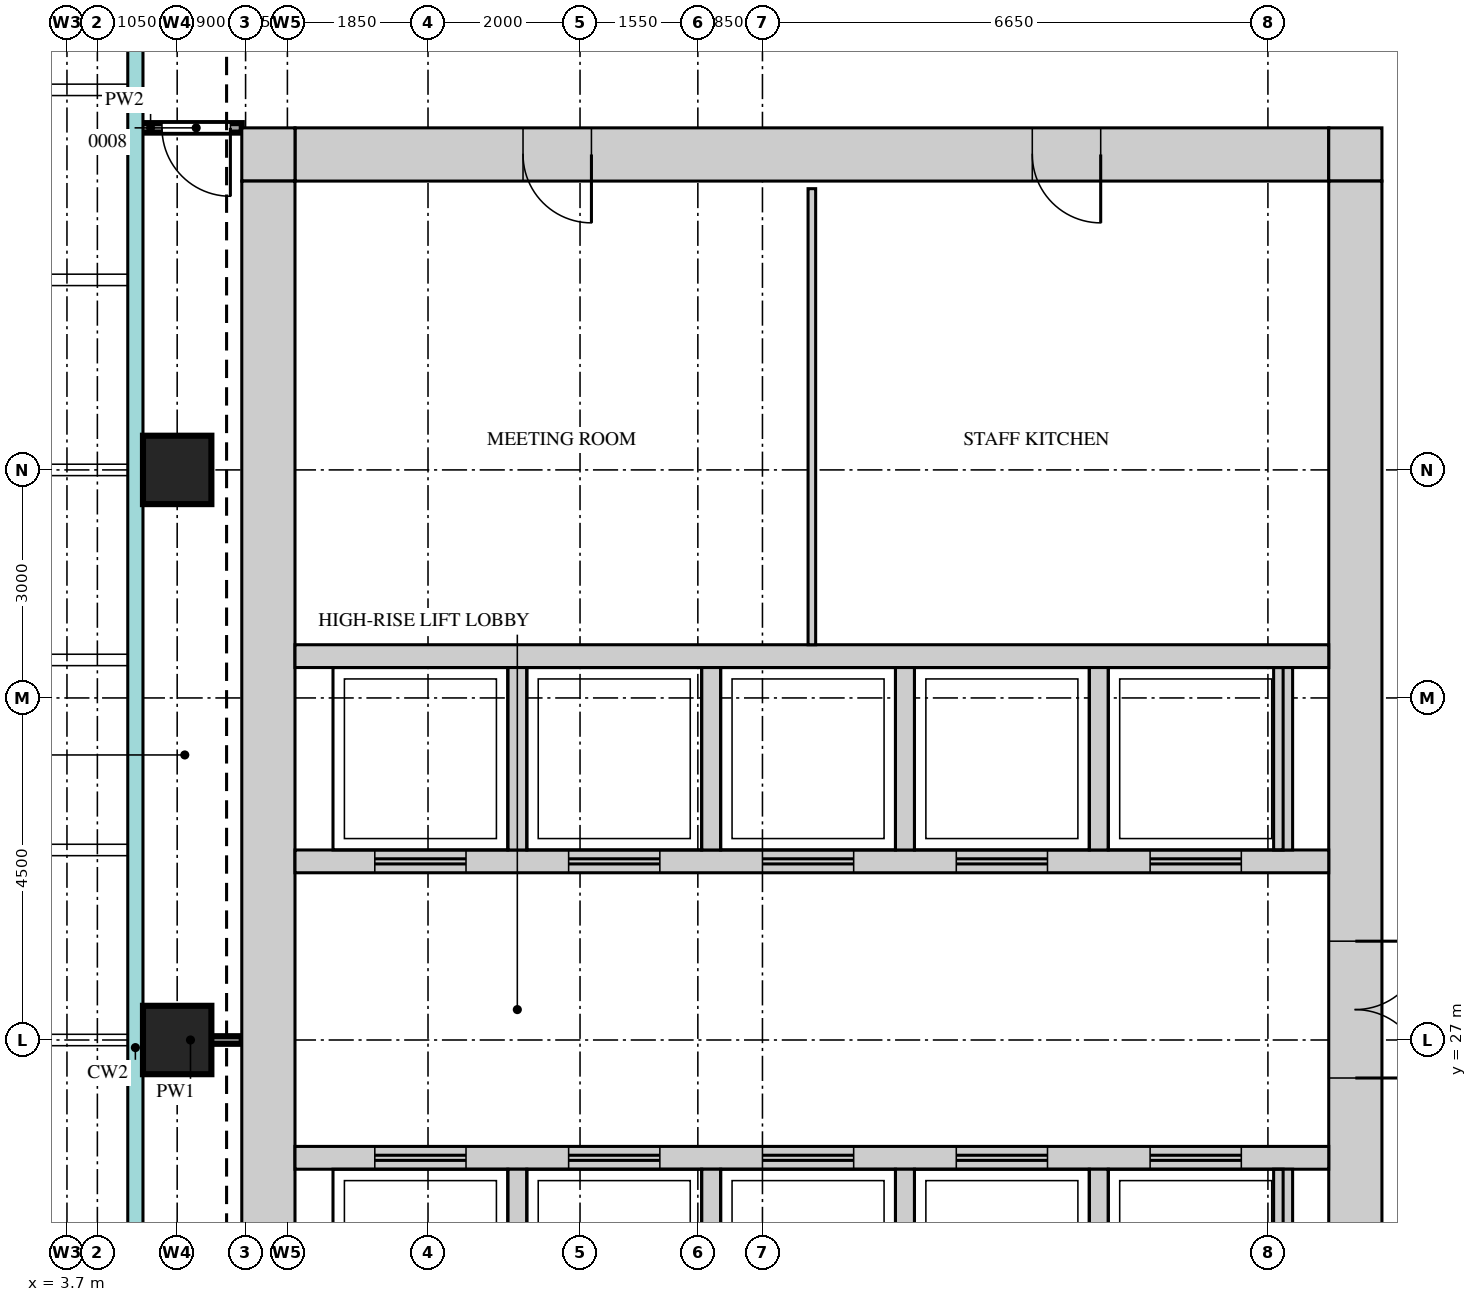
"""IFC4 building model, lengths in metres.
Left out: names, types, materials, properties, quantities, classifications, styles, units other than length and angle.
Written with IfcOpenShell. Run it as: python <this file> out.ifc"""

import sys

from ifc_helpers import new_model, si_unit, direction, frame, frame_2d, origin, origin_2d, place, context, subcontext, project, spatial, rectangle, extrude, source, transform, mapped, element, fill, save


model = new_model("IFC4")
c1 = context("Model", 3, precision=1e-05, world=origin(), true_north=direction((0.0, 1.0)))
c2 = subcontext(c1, "Body", "Model", "MODEL_VIEW")
j1 = project(units=[si_unit("LENGTHUNIT", "METRE"), si_unit("PLANEANGLEUNIT", "RADIAN")], contexts=[c1])
p1 = place(None, origin())
s1 = spatial("IfcSite", under=j1, at=p1, CompositionType="ELEMENT")
p2 = place(p1, origin())
s2 = spatial("IfcBuilding", under=s1, at=p2, CompositionType="ELEMENT")
p3 = place(p2, frame((0.0, 0.0, 222.2)))
s3 = spatial("IfcBuildingStorey", under=s2, at=p3, CompositionType="ELEMENT", Elevation=222.2)
m1 = source(origin(), c2, "Body", "SweptSolid", [
    extrude(rectangle(XDim=13.6, YDim=0.7, at=frame_2d((6.8, 0.0))), origin(), (0.0, 0.0, 1.0), 3.75),
])
p4 = place(p3, frame((6.7, 38.65, 0.0), z_axis=(0.0, 0.0, 1.0), x_axis=(1.0, 0.0, 0.0)))
e1 = element("IfcWall", 1, at=p4, inside=s3, PredefinedType="SHEAR", context=c2, shape_type="MappedRepresentation", body=[
    mapped(m1, transform((0.0, 0.0, 0.0))),
])
m2 = source(origin(), c2, "Body", "SweptSolid", [
    extrude(rectangle(XDim=0.9, YDim=2.1, at=frame_2d((0.45, 1.05))), frame((0.0, 0.36, 0.0), z_axis=(0.0, -1.0, 0.0), x_axis=(1.0, 0.0, 0.0)), (0.0, 0.0, 1.0), 0.72),
])
p5 = place(p4, frame((3.0, 0.0, 0.0)))
e2 = element("IfcOpeningElement", 2, at=p5, cuts=e1, PredefinedType="OPENING", context=c2, shape_type="MappedRepresentation", body=[
    mapped(m2, transform((0.0, 0.0, 0.0))),
])
p6 = place(p4, frame((9.7, 0.0, 0.0)))
e3 = element("IfcOpeningElement", 3, at=p6, cuts=e1, PredefinedType="OPENING", context=c2, shape_type="MappedRepresentation", body=[
    mapped(m2, transform((0.0, 0.0, 0.0))),
])
m3 = source(origin(), c2, "Body", "SweptSolid", [
    extrude(rectangle(XDim=0.7, YDim=0.7, at=frame_2d((0.35, 0.0))), origin(), (0.0, 0.0, 1.0), 3.75),
])
for number, where, z_axis, x_axis in (
    (4, (20.3, 38.65, 0.0), (0.0, 0.0, 1.0), (1.0, 0.0, 0.0)),
    (5, (6.0, 38.65, 0.0), (0.0, 0.0, 1.0), (1.0, 0.0, 0.0)),
):
    element("IfcWall", number, at=place(p3, frame(where, z_axis=z_axis, x_axis=x_axis)), inside=s3, PredefinedType="SHEAR", context=c2, shape_type="MappedRepresentation", body=[
        mapped(m3, transform((0.0, 0.0, 0.0))),
    ])
m4 = source(origin(), c2, "Body", "SweptSolid", [
    extrude(rectangle(XDim=22.6, YDim=0.7, at=frame_2d((11.3, 0.0))), origin(), (0.0, 0.0, 1.0), 3.75),
])
p7 = place(p3, frame((20.65, 15.7, 0.0), z_axis=(0.0, 0.0, 1.0), x_axis=(0.0, 1.0, 0.0)))
e6 = element("IfcWall", 6, at=p7, inside=s3, PredefinedType="SHEAR", context=c2, shape_type="MappedRepresentation", body=[
    mapped(m4, transform((0.0, 0.0, 0.0))),
])
m5 = source(origin(), c2, "Body", "SweptSolid", [
    extrude(rectangle(XDim=1.8, YDim=2.1, at=frame_2d((0.9, 1.05))), frame((0.0, 0.36, 0.0), z_axis=(0.0, -1.0, 0.0), x_axis=(1.0, 0.0, 0.0)), (0.0, 0.0, 1.0), 0.72),
])
p8 = place(p7, frame((10.8, 0.0, 0.0)))
e7 = element("IfcOpeningElement", 7, at=p8, cuts=e6, PredefinedType="OPENING", context=c2, shape_type="MappedRepresentation", body=[
    mapped(m5, transform((0.0, 0.0, 0.0))),
])
p9 = place(p7, frame((0.45, 0.0, 0.0)))
e8 = element("IfcOpeningElement", 8, at=p9, cuts=e6, PredefinedType="OPENING", context=c2, shape_type="MappedRepresentation", body=[
    mapped(m2, transform((0.0, 0.0, 0.0))),
])
p10 = place(p7, frame((2.9, 0.0, 0.0)))
e9 = element("IfcOpeningElement", 9, at=p10, cuts=e6, PredefinedType="OPENING", context=c2, shape_type="MappedRepresentation", body=[
    mapped(m2, transform((0.0, 0.0, 0.0))),
])
p11 = place(p7, frame((5.65, 0.0, 0.0)))
e10 = element("IfcOpeningElement", 10, at=p11, cuts=e6, PredefinedType="OPENING", context=c2, shape_type="MappedRepresentation", body=[
    mapped(m2, transform((0.0, 0.0, 0.0))),
])
p12 = place(p3, frame((6.35, 15.7, 0.0), z_axis=(0.0, 0.0, 1.0), x_axis=(0.0, 1.0, 0.0)))
e11 = element("IfcWall", 11, at=p12, inside=s3, PredefinedType="SHEAR", context=c2, shape_type="MappedRepresentation", body=[
    mapped(m4, transform((0.0, 0.0, 0.0))),
])
m6 = source(origin(), c2, "Body", "SweptSolid", [
    extrude(rectangle(XDim=13.6, YDim=0.3, at=frame_2d((6.8, 0.0))), origin(), (0.0, 0.0, 1.0), 3.75),
])
p13 = place(p3, frame((6.7, 32.05, 0.0), z_axis=(0.0, 0.0, 1.0), x_axis=(1.0, 0.0, 0.0)))
e12 = element("IfcWall", 12, at=p13, inside=s3, PredefinedType="STANDARD", context=c2, shape_type="MappedRepresentation", body=[
    mapped(m6, transform((0.0, 0.0, 0.0))),
])
p14 = place(p3, frame((6.7, 29.35, 0.0), z_axis=(0.0, 0.0, 1.0), x_axis=(1.0, 0.0, 0.0)))
e13 = element("IfcWall", 13, at=p14, inside=s3, PredefinedType="STANDARD", context=c2, shape_type="MappedRepresentation", body=[
    mapped(m6, transform((0.0, 0.0, 0.0))),
])
m7 = source(origin(), c2, "Body", "SweptSolid", [
    extrude(rectangle(XDim=1.2, YDim=2.1, at=frame_2d((0.6, 1.05))), frame((0.0, 0.16, 0.0), z_axis=(0.0, -1.0, 0.0), x_axis=(1.0, 0.0, 0.0)), (0.0, 0.0, 1.0), 0.32),
])
p15 = place(p14, frame((1.05, 0.0, 0.0)))
e14 = element("IfcOpeningElement", 14, at=p15, cuts=e13, PredefinedType="OPENING", context=c2, shape_type="MappedRepresentation", body=[
    mapped(m7, transform((0.0, 0.0, 0.0))),
])
p16 = place(p14, frame((3.6, 0.0, 0.0)))
e15 = element("IfcOpeningElement", 15, at=p16, cuts=e13, PredefinedType="OPENING", context=c2, shape_type="MappedRepresentation", body=[
    mapped(m7, transform((0.0, 0.0, 0.0))),
])
p17 = place(p14, frame((6.15, 0.0, 0.0)))
e16 = element("IfcOpeningElement", 16, at=p17, cuts=e13, PredefinedType="OPENING", context=c2, shape_type="MappedRepresentation", body=[
    mapped(m7, transform((0.0, 0.0, 0.0))),
])
p18 = place(p14, frame((8.7, 0.0, 0.0)))
e17 = element("IfcOpeningElement", 17, at=p18, cuts=e13, PredefinedType="OPENING", context=c2, shape_type="MappedRepresentation", body=[
    mapped(m7, transform((0.0, 0.0, 0.0))),
])
p19 = place(p14, frame((11.25, 0.0, 0.0)))
e18 = element("IfcOpeningElement", 18, at=p19, cuts=e13, PredefinedType="OPENING", context=c2, shape_type="MappedRepresentation", body=[
    mapped(m7, transform((0.0, 0.0, 0.0))),
])
p20 = place(p3, frame((6.7, 25.45, 0.0), z_axis=(0.0, 0.0, 1.0), x_axis=(1.0, 0.0, 0.0)))
e19 = element("IfcWall", 19, at=p20, inside=s3, PredefinedType="STANDARD", context=c2, shape_type="MappedRepresentation", body=[
    mapped(m6, transform((0.0, 0.0, 0.0))),
])
p21 = place(p20, frame((1.05, 0.0, 0.0)))
e20 = element("IfcOpeningElement", 20, at=p21, cuts=e19, PredefinedType="OPENING", context=c2, shape_type="MappedRepresentation", body=[
    mapped(m7, transform((0.0, 0.0, 0.0))),
])
p22 = place(p20, frame((3.6, 0.0, 0.0)))
e21 = element("IfcOpeningElement", 21, at=p22, cuts=e19, PredefinedType="OPENING", context=c2, shape_type="MappedRepresentation", body=[
    mapped(m7, transform((0.0, 0.0, 0.0))),
])
p23 = place(p20, frame((6.15, 0.0, 0.0)))
e22 = element("IfcOpeningElement", 22, at=p23, cuts=e19, PredefinedType="OPENING", context=c2, shape_type="MappedRepresentation", body=[
    mapped(m7, transform((0.0, 0.0, 0.0))),
])
p24 = place(p20, frame((8.7, 0.0, 0.0)))
e23 = element("IfcOpeningElement", 23, at=p24, cuts=e19, PredefinedType="OPENING", context=c2, shape_type="MappedRepresentation", body=[
    mapped(m7, transform((0.0, 0.0, 0.0))),
])
p25 = place(p20, frame((11.25, 0.0, 0.0)))
e24 = element("IfcOpeningElement", 24, at=p25, cuts=e19, PredefinedType="OPENING", context=c2, shape_type="MappedRepresentation", body=[
    mapped(m7, transform((0.0, 0.0, 0.0))),
])
m8 = source(origin(), c2, "Body", "SweptSolid", [
    extrude(rectangle(XDim=2.4, YDim=0.25, at=frame_2d((1.2, 0.0))), origin(), (0.0, 0.0, 1.0), 3.75),
])
for number, where, z_axis, x_axis in (
    (25, (17.275, 29.5, 0.0), (0.0, 0.0, 1.0), (0.0, 1.0, 0.0)),
    (26, (19.7, 29.5, 0.0), (0.0, 0.0, 1.0), (0.0, 1.0, 0.0)),
    (27, (9.625, 29.5, 0.0), (0.0, 0.0, 1.0), (0.0, 1.0, 0.0)),
    (28, (12.175, 29.5, 0.0), (0.0, 0.0, 1.0), (0.0, 1.0, 0.0)),
    (29, (14.725, 29.5, 0.0), (0.0, 0.0, 1.0), (0.0, 1.0, 0.0)),
):
    element("IfcWall", number, at=place(p3, frame(where, z_axis=z_axis, x_axis=x_axis)), inside=s3, PredefinedType="STANDARD", context=c2, shape_type="MappedRepresentation", body=[
        mapped(m8, transform((0.0, 0.0, 0.0))),
    ])
m9 = source(origin(), c2, "Body", "SweptSolid", [
    extrude(rectangle(XDim=2.4, YDim=0.25, at=frame_2d((1.2, 0.0))), origin(), (0.0, 0.0, 1.0), 3.75),
])
for number, where, z_axis, x_axis in (
    (30, (17.275, 22.9, 0.0), (0.0, 0.0, 1.0), (0.0, 1.0, 0.0)),
    (31, (19.7, 22.9, 0.0), (0.0, 0.0, 1.0), (0.0, 1.0, 0.0)),
    (32, (9.625, 22.9, 0.0), (0.0, 0.0, 1.0), (0.0, 1.0, 0.0)),
    (33, (12.175, 22.9, 0.0), (0.0, 0.0, 1.0), (0.0, 1.0, 0.0)),
    (34, (14.725, 22.9, 0.0), (0.0, 0.0, 1.0), (0.0, 1.0, 0.0)),
):
    element("IfcWall", number, at=place(p3, frame(where, z_axis=z_axis, x_axis=x_axis)), inside=s3, PredefinedType="STANDARD", context=c2, shape_type="MappedRepresentation", body=[
        mapped(m9, transform((0.0, 0.0, 0.0))),
    ])
m10 = source(origin(), c2, "Body", "SweptSolid", [
    extrude(rectangle(XDim=0.9, YDim=0.9, at=origin_2d()), origin(), (0.0, 0.0, 1.0), 3.75),
])
for number, where, z_axis, x_axis in (
    (35, (5.15, 27.0, 0.0), (0.0, 0.0, 1.0), (1.0, 0.0, 0.0)),
    (36, (5.15, 34.5, 0.0), (0.0, 0.0, 1.0), (1.0, 0.0, 0.0)),
):
    element("IfcColumn", number, at=place(p3, frame(where, z_axis=z_axis, x_axis=x_axis)), inside=s3, PredefinedType="COLUMN", context=c2, shape_type="MappedRepresentation", body=[
        mapped(m10, transform((0.0, 0.0, 0.0))),
    ])
m11 = source(origin(), c2, "Body", "SweptSolid", [
    extrude(rectangle(XDim=1.35, YDim=0.1, at=frame_2d((0.675, 0.0))), origin(), (0.0, 0.0, 1.0), 3.8),
])
p26 = place(p3, frame((4.65, 27.0, 0.0), z_axis=(0.0, 0.0, 1.0), x_axis=(1.0, 0.0, 0.0)))
e37 = element("IfcWall", 37, at=p26, inside=s3, PredefinedType="PARTITIONING", context=c2, shape_type="MappedRepresentation", body=[
    mapped(m11, transform((0.0, 0.0, 0.0))),
])
m12 = source(origin(), c2, "Body", "SweptSolid", [
    extrude(rectangle(XDim=6.0, YDim=0.1, at=frame_2d((3.0, 0.0))), origin(), (0.0, 0.0, 1.0), 3.8),
])
p27 = place(p3, frame((13.5, 32.2, 0.0), z_axis=(0.0, 0.0, 1.0), x_axis=(0.0, 1.0, 0.0)))
e38 = element("IfcWall", 38, at=p27, inside=s3, PredefinedType="PARTITIONING", context=c2, shape_type="MappedRepresentation", body=[
    mapped(m12, transform((0.0, 0.0, 0.0))),
])
m13 = source(origin(), c2, "Body", "SweptSolid", [
    extrude(rectangle(XDim=1.35, YDim=0.125, at=frame_2d((0.675, 0.0))), origin(), (0.0, 0.0, 1.0), 3.8),
])
p28 = place(p3, frame((4.65, 39.0, 0.0), z_axis=(0.0, 0.0, 1.0), x_axis=(1.0, 0.0, 0.0)))
e39 = element("IfcWall", 39, at=p28, inside=s3, PredefinedType="PARTITIONING", context=c2, shape_type="MappedRepresentation", body=[
    mapped(m13, transform((0.0, 0.0, 0.0))),
])
m14 = source(origin(), c2, "Body", "SweptSolid", [
    extrude(rectangle(XDim=0.9, YDim=2.1, at=frame_2d((0.45, 1.05))), frame((0.0, 0.073, 0.0), z_axis=(0.0, -1.0, 0.0), x_axis=(1.0, 0.0, 0.0)), (0.0, 0.0, 1.0), 0.145),
])
p29 = place(p28, frame((0.3, 0.0, 0.0)))
e40 = element("IfcOpeningElement", 40, at=p29, cuts=e39, PredefinedType="OPENING", context=c2, shape_type="MappedRepresentation", body=[
    mapped(m14, transform((0.0, 0.0, 0.0))),
])
m15 = source(origin(), c2, "Body", "SweptSolid", [
    extrude(rectangle(XDim=1.8, YDim=2.1, at=frame_2d((0.9, 1.05))), frame((0.0, 0.3, 0.0), z_axis=(0.0, -1.0, 0.0), x_axis=(1.0, 0.0, 0.0)), (0.0, 0.0, 1.0), 0.6),
])
p30 = place(p8, origin())
e41 = element("IfcDoor", 41, at=p30, inside=s3, OperationType="DOUBLE_DOOR_SINGLE_SWING", PredefinedType="DOOR", context=c2, shape_type="MappedRepresentation", body=[
    mapped(m15, transform((0.0, 0.0, 0.0))),
])
fill(e7, e41)
m16 = source(origin(), c2, "Body", "SweptSolid", [
    extrude(rectangle(XDim=0.9, YDim=2.1, at=frame_2d((0.45, 1.05))), frame((0.0, 0.3, 0.0), z_axis=(0.0, -1.0, 0.0), x_axis=(1.0, 0.0, 0.0)), (0.0, 0.0, 1.0), 0.6),
])
p31 = place(p5, origin())
e42 = element("IfcDoor", 42, at=p31, inside=s3, OperationType="SINGLE_SWING_RIGHT", PredefinedType="DOOR", context=c2, shape_type="MappedRepresentation", body=[
    mapped(m16, transform((0.0, 0.0, 0.0))),
])
fill(e2, e42)
p32 = place(p6, origin())
e43 = element("IfcDoor", 43, at=p32, inside=s3, OperationType="SINGLE_SWING_RIGHT", PredefinedType="DOOR", context=c2, shape_type="MappedRepresentation", body=[
    mapped(m16, transform((0.0, 0.0, 0.0))),
])
fill(e3, e43)
m17 = source(origin(), c2, "Body", "SweptSolid", [
    extrude(rectangle(XDim=0.9, YDim=2.1, at=frame_2d((0.45, 1.05))), frame((0.0, 0.025, 0.0), z_axis=(0.0, -1.0, 0.0), x_axis=(1.0, 0.0, 0.0)), (0.0, 0.0, 1.0), 0.05),
])
p33 = place(p29, origin())
e44 = element("IfcDoor", 44, at=p33, inside=s3, OperationType="SINGLE_SWING_RIGHT", PredefinedType="DOOR", context=c2, shape_type="MappedRepresentation", body=[
    mapped(m17, transform((0.0, 0.0, 0.0))),
])
fill(e40, e44)
m18 = source(origin(), c2, "Body", "SweptSolid", [
    extrude(rectangle(XDim=1.2, YDim=2.1, at=frame_2d((0.6, 1.05))), frame((0.0, 0.025, 0.0), z_axis=(0.0, -1.0, 0.0), x_axis=(1.0, 0.0, 0.0)), (0.0, 0.0, 1.0), 0.05),
])
p34 = place(p21, origin())
e45 = element("IfcDoor", 45, at=p34, inside=s3, OperationType="DOUBLE_DOOR_SLIDING", PredefinedType="DOOR", context=c2, shape_type="MappedRepresentation", body=[
    mapped(m18, transform((0.0, 0.0, 0.0))),
])
fill(e20, e45)
p35 = place(p22, origin())
e46 = element("IfcDoor", 46, at=p35, inside=s3, OperationType="DOUBLE_DOOR_SLIDING", PredefinedType="DOOR", context=c2, shape_type="MappedRepresentation", body=[
    mapped(m18, transform((0.0, 0.0, 0.0))),
])
fill(e21, e46)
p36 = place(p23, origin())
e47 = element("IfcDoor", 47, at=p36, inside=s3, OperationType="DOUBLE_DOOR_SLIDING", PredefinedType="DOOR", context=c2, shape_type="MappedRepresentation", body=[
    mapped(m18, transform((0.0, 0.0, 0.0))),
])
fill(e22, e47)
p37 = place(p24, origin())
e48 = element("IfcDoor", 48, at=p37, inside=s3, OperationType="DOUBLE_DOOR_SLIDING", PredefinedType="DOOR", context=c2, shape_type="MappedRepresentation", body=[
    mapped(m18, transform((0.0, 0.0, 0.0))),
])
fill(e23, e48)
p38 = place(p25, origin())
e49 = element("IfcDoor", 49, at=p38, inside=s3, OperationType="DOUBLE_DOOR_SLIDING", PredefinedType="DOOR", context=c2, shape_type="MappedRepresentation", body=[
    mapped(m18, transform((0.0, 0.0, 0.0))),
])
fill(e24, e49)
p39 = place(p15, origin())
e50 = element("IfcDoor", 50, at=p39, inside=s3, OperationType="DOUBLE_DOOR_SLIDING", PredefinedType="DOOR", context=c2, shape_type="MappedRepresentation", body=[
    mapped(m18, transform((0.0, 0.0, 0.0))),
])
fill(e14, e50)
p40 = place(p16, origin())
e51 = element("IfcDoor", 51, at=p40, inside=s3, OperationType="DOUBLE_DOOR_SLIDING", PredefinedType="DOOR", context=c2, shape_type="MappedRepresentation", body=[
    mapped(m18, transform((0.0, 0.0, 0.0))),
])
fill(e15, e51)
p41 = place(p17, origin())
e52 = element("IfcDoor", 52, at=p41, inside=s3, OperationType="DOUBLE_DOOR_SLIDING", PredefinedType="DOOR", context=c2, shape_type="MappedRepresentation", body=[
    mapped(m18, transform((0.0, 0.0, 0.0))),
])
fill(e16, e52)
p42 = place(p18, origin())
e53 = element("IfcDoor", 53, at=p42, inside=s3, OperationType="DOUBLE_DOOR_SLIDING", PredefinedType="DOOR", context=c2, shape_type="MappedRepresentation", body=[
    mapped(m18, transform((0.0, 0.0, 0.0))),
])
fill(e17, e53)
p43 = place(p19, origin())
e54 = element("IfcDoor", 54, at=p43, inside=s3, OperationType="DOUBLE_DOOR_SLIDING", PredefinedType="DOOR", context=c2, shape_type="MappedRepresentation", body=[
    mapped(m18, transform((0.0, 0.0, 0.0))),
])
fill(e18, e54)
save(model, sys.argv[1])
